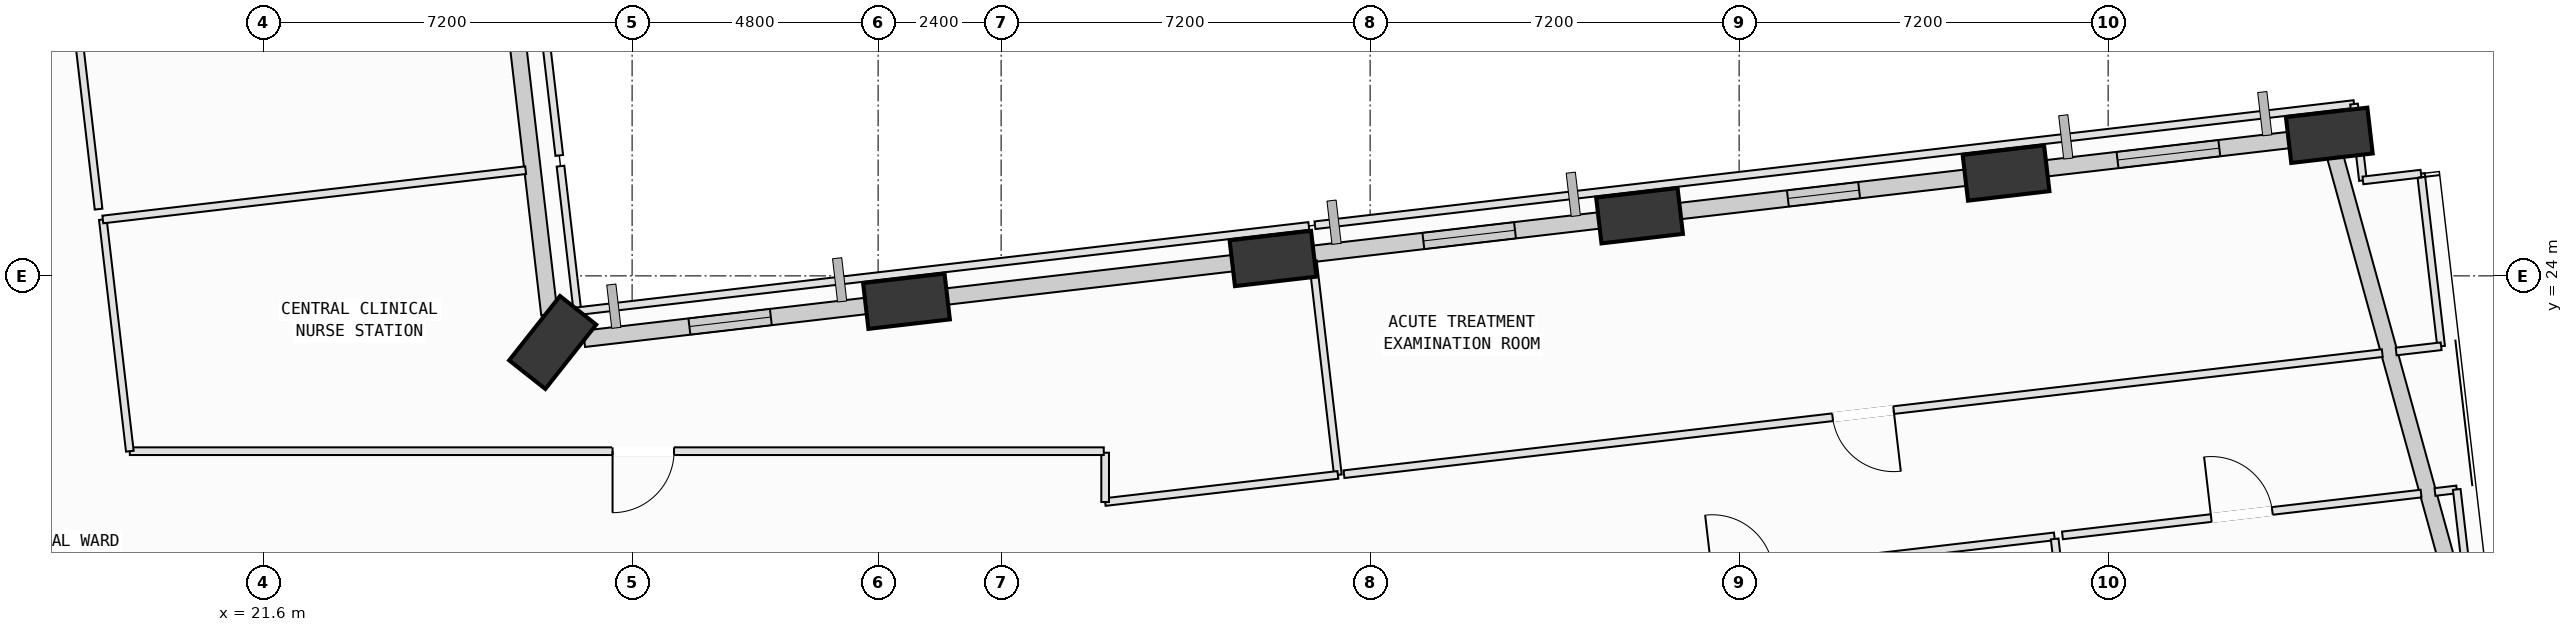
"""IFC4 building model, lengths in metres.
Left out: names, types, materials, properties, quantities, classifications, styles, units other than length and angle.
Written with IfcOpenShell. Run it as: python <this file> out.ifc"""

import sys

from ifc_helpers import new_model, si_unit, direction, frame, frame_2d, origin, origin_2d, place, context, subcontext, project, spatial, rectangle, extrude, element, fill, save


model = new_model("IFC4")
c1 = context("Model", 3, precision=1e-05, world=origin(), true_north=direction((0.0, 1.0)))
c2 = subcontext(c1, "Body", "Model", "MODEL_VIEW")
j1 = project(units=[si_unit("LENGTHUNIT", "METRE"), si_unit("PLANEANGLEUNIT", "RADIAN")], contexts=[c1])
p1 = place(None, origin())
s1 = spatial("IfcSite", under=j1, at=p1, CompositionType="ELEMENT")
p2 = place(p1, origin())
s2 = spatial("IfcBuilding", under=s1, at=p2, CompositionType="ELEMENT")
p3 = place(p2, frame((0.0, 0.0, 51.0)))
s3 = spatial("IfcBuildingStorey", under=s2, at=p3, CompositionType="ELEMENT", Elevation=51.0)
p4 = place(p3, frame((64.529, 17.281, 0.002), z_axis=(0.029857269994, 0.127362756182, 0.991406713598), x_axis=(-0.112008268746, -0.985175573606, 0.129935510555)))
e1 = element("IfcColumn", 1, at=p4, inside=s3, PredefinedType="COLUMN", context=c2, shape_type="SweptSolid", body=[
    extrude(rectangle(XDim=1.6, YDim=0.9, at=origin_2d()), origin(), (0.0, 0.0, 1.0), 4.031),
])
p5 = place(p3, frame((61.916, 26.742, 0.002), z_axis=(-0.008918351328, 0.11648458877, 0.993152457374), x_axis=(-0.981593797362, -0.190500884443, 0.013528858272)))
e2 = element("IfcColumn", 2, at=p5, inside=s3, PredefinedType="COLUMN", context=c2, shape_type="SweptSolid", body=[
    extrude(rectangle(XDim=1.6, YDim=0.9, at=origin_2d()), origin(), (0.0, 0.0, 1.0), 4.024),
])
p6 = place(p3, frame((55.608, 26.007, 0.002), z_axis=(-0.005779215637, 0.090824936271, 0.995850104995), x_axis=(-0.983944135111, -0.178165274591, 0.01053916079)))
e3 = element("IfcColumn", 3, at=p6, inside=s3, PredefinedType="COLUMN", context=c2, shape_type="SweptSolid", body=[
    extrude(rectangle(XDim=1.6, YDim=0.9, at=origin_2d()), origin(), (0.0, 0.0, 1.0), 4.013),
])
p7 = place(p3, frame((48.457, 25.173, 0.002), z_axis=(-0.002073039244, 0.061459516411, 0.998107424254), x_axis=(-0.988811054512, -0.149003306993, 0.007121304679)))
e4 = element("IfcColumn", 4, at=p7, inside=s3, PredefinedType="COLUMN", context=c2, shape_type="SweptSolid", body=[
    extrude(rectangle(XDim=1.6, YDim=0.9, at=origin_2d()), origin(), (0.0, 0.0, 1.0), 4.004),
])
p8 = place(p3, frame((41.305, 24.339, 0.002), z_axis=(0.001648515221, 0.031932350395, 0.99948867297), x_axis=(-0.997918513373, -0.064381129267, 0.003702817988)))
e5 = element("IfcColumn", 5, at=p8, inside=s3, PredefinedType="COLUMN", context=c2, shape_type="SweptSolid", body=[
    extrude(rectangle(XDim=1.6, YDim=0.9, at=origin_2d()), origin(), (0.0, 0.0, 1.0), 3.999),
])
p9 = place(p3, frame((34.154, 23.505, 0.002), z_axis=(0.005375595078, 0.002321279693, 0.999982857172), x_axis=(-0.500082287916, 0.865977624149, 0.000678075236)))
e6 = element("IfcColumn", 6, at=p9, inside=s3, PredefinedType="COLUMN", context=c2, shape_type="SweptSolid", body=[
    extrude(rectangle(XDim=1.6, YDim=0.9, at=origin_2d()), origin(), (0.0, 0.0, 1.0), 3.997),
])
p10 = place(p3, frame((27.25, 22.7, 0.002), z_axis=(0.008915338455, -0.026196439708, 0.999617058321), x_axis=(0.334811753302, 0.942035106952, 0.021701316121)))
e7 = element("IfcColumn", 7, at=p10, inside=s3, PredefinedType="COLUMN", context=c2, shape_type="SweptSolid", body=[
    extrude(rectangle(XDim=1.6, YDim=0.9, at=origin_2d()), origin(), (0.0, 0.0, 1.0), 3.998),
])
p11 = place(p3, frame((62.015, 26.38, 0.0), z_axis=(0.0, 0.0, 1.0), x_axis=(0.266250491898, -0.963903872574, 0.0)))
e8 = element("IfcWall", 8, at=p11, inside=s3, PredefinedType="SOLIDWALL", context=c2, shape_type="SweptSolid", body=[
    extrude(rectangle(XDim=8.614, YDim=0.32, at=frame_2d((4.307, 0.0))), origin(), (0.0, 0.0, 1.0), 3.165),
])
p12 = place(p3, frame((56.194, 26.075, 0.0), z_axis=(0.0, 0.0, 1.0), x_axis=(0.993271318264, 0.115810570822, 0.0)))
e9 = element("IfcWall", 9, at=p12, inside=s3, PredefinedType="SOLIDWALL", context=c2, shape_type="SweptSolid", body=[
    extrude(rectangle(XDim=5.209, YDim=0.32, at=frame_2d((2.604, 0.0))), origin(), (0.0, 0.0, 1.0), 3.165),
])
p13 = place(p12, frame((1.6, 0.0, 0.75)))
e10 = element("IfcOpeningElement", 10, at=p13, cuts=e9, PredefinedType="OPENING", context=c2, shape_type="SweptSolid", body=[
    extrude(rectangle(XDim=2.0, YDim=1.95, at=frame_2d((1.0, 0.975))), frame((0.0, 0.17, 0.0), z_axis=(0.0, -1.0, 0.0), x_axis=(1.0, 0.0, 0.0)), (0.0, 0.0, 1.0), 0.34),
])
p14 = place(p3, frame((49.058, 25.243, 0.0), z_axis=(0.0, 0.0, 1.0), x_axis=(0.993274795212, 0.115780746223, 0.0)))
e11 = element("IfcWall", 11, at=p14, inside=s3, PredefinedType="SOLIDWALL", context=c2, shape_type="SweptSolid", body=[
    extrude(rectangle(XDim=6.024, YDim=0.32, at=frame_2d((3.012, 0.0))), origin(), (0.0, 0.0, 1.0), 3.165),
])
p15 = place(p14, frame((2.309, 0.0, 0.75)))
e12 = element("IfcOpeningElement", 12, at=p15, cuts=e11, PredefinedType="OPENING", context=c2, shape_type="SweptSolid", body=[
    extrude(rectangle(XDim=1.4, YDim=1.85, at=frame_2d((0.7, 0.925))), frame((0.0, 0.17, 0.0), z_axis=(0.0, -1.0, 0.0), x_axis=(1.0, 0.0, 0.0)), (0.0, 0.0, 1.0), 0.34),
])
p16 = place(p3, frame((41.916, 24.41, 0.0), z_axis=(0.0, 0.0, 1.0), x_axis=(0.993271177126, 0.115811781314, 0.0)))
e13 = element("IfcWall", 13, at=p16, inside=s3, PredefinedType="SOLIDWALL", context=c2, shape_type="SweptSolid", body=[
    extrude(rectangle(XDim=6.0, YDim=0.32, at=frame_2d((3.0, 0.0))), origin(), (0.0, 0.0, 1.0), 3.165),
])
p17 = place(p16, frame((2.338, 0.0, 0.75)))
e14 = element("IfcOpeningElement", 14, at=p17, cuts=e13, PredefinedType="OPENING", context=c2, shape_type="SweptSolid", body=[
    extrude(rectangle(XDim=1.8, YDim=2.05, at=frame_2d((0.9, 1.025))), frame((0.0, 0.17, 0.0), z_axis=(0.0, -1.0, 0.0), x_axis=(1.0, 0.0, 0.0)), (0.0, 0.0, 1.0), 0.34),
])
p18 = place(p3, frame((34.769, 23.577, 0.0), z_axis=(0.0, 0.0, 1.0), x_axis=(0.993271428488, 0.115809625458, 0.0)))
e15 = element("IfcWall", 15, at=p18, inside=s3, PredefinedType="SOLIDWALL", context=c2, shape_type="SweptSolid", body=[
    extrude(rectangle(XDim=5.987, YDim=0.32, at=frame_2d((2.994, 0.0))), origin(), (0.0, 0.0, 1.0), 3.165),
])
p19 = place(p3, frame((27.863, 22.772, 0.0), z_axis=(0.0, 0.0, 1.0), x_axis=(0.993271790668, 0.115806519085, 0.0)))
e16 = element("IfcWall", 16, at=p19, inside=s3, PredefinedType="SOLIDWALL", context=c2, shape_type="SweptSolid", body=[
    extrude(rectangle(XDim=5.736, YDim=0.32, at=frame_2d((2.868, 0.0))), origin(), (0.0, 0.0, 1.0), 3.165),
])
p20 = place(p19, frame((2.069, 0.0, 0.75)))
e17 = element("IfcOpeningElement", 17, at=p20, cuts=e16, PredefinedType="OPENING", context=c2, shape_type="SweptSolid", body=[
    extrude(rectangle(XDim=1.6, YDim=1.95, at=frame_2d((0.8, 0.975))), frame((0.0, 0.17, 0.0), z_axis=(0.0, -1.0, 0.0), x_axis=(1.0, 0.0, 0.0)), (0.0, 0.0, 1.0), 0.34),
])
p21 = place(p3, frame((27.186, 23.25, 0.0), z_axis=(0.0, 0.0, 1.0), x_axis=(-0.115796553451, 0.993272952521, 0.0)))
e18 = element("IfcWall", 18, at=p21, inside=s3, PredefinedType="SOLIDWALL", context=c2, shape_type="SweptSolid", body=[
    extrude(rectangle(XDim=6.536, YDim=0.32, at=frame_2d((3.268, 0.0))), origin(), (0.0, 0.0, 1.0), 3.165),
])
p22 = place(p3, frame((44.393, 17.501, 0.0), z_axis=(0.0, 0.0, 1.0), x_axis=(0.993276639016, 0.115764927265, 0.0)))
e19 = element("IfcWall", 19, at=p22, inside=s3, PredefinedType="PARTITIONING", context=c2, shape_type="SweptSolid", body=[
    extrude(rectangle(XDim=12.24, YDim=0.15, at=frame_2d((6.12, 0.0))), origin(), (0.0, 0.0, 1.0), 3.78),
])
p23 = place(p22, frame((5.52, 0.0, 0.0)))
e20 = element("IfcOpeningElement", 20, at=p23, cuts=e19, PredefinedType="OPENING", context=c2, shape_type="SweptSolid", body=[
    extrude(rectangle(XDim=1.2, YDim=2.15, at=frame_2d((0.6, 1.075))), frame((0.0, 0.085, 0.0), z_axis=(0.0, -1.0, 0.0), x_axis=(1.0, 0.0, 0.0)), (0.0, 0.0, 1.0), 0.17),
])
p24 = place(p3, frame((56.557, 18.868, 0.0), z_axis=(0.0, 0.0, 1.0), x_axis=(0.115751957705, -0.993278150513, 0.0)))
e21 = element("IfcWall", 21, at=p24, inside=s3, PredefinedType="PARTITIONING", context=c2, shape_type="SweptSolid", body=[
    extrude(rectangle(XDim=13.564, YDim=0.15, at=frame_2d((6.782, 0.0))), origin(), (0.0, 0.0, 1.0), 3.78),
])
p25 = place(p3, frame((56.709, 18.937, 0.0), z_axis=(0.0, 0.0, 1.0), x_axis=(0.993269785823, 0.115823713336, 0.0)))
e22 = element("IfcWall", 22, at=p25, inside=s3, PredefinedType="PARTITIONING", context=c2, shape_type="SweptSolid", body=[
    extrude(rectangle(XDim=7.044, YDim=0.15, at=frame_2d((3.522, 0.0))), origin(), (0.0, 0.0, 1.0), 3.78),
])
p26 = place(p25, frame((2.922, 0.0, 0.0)))
e23 = element("IfcOpeningElement", 23, at=p26, cuts=e22, PredefinedType="OPENING", context=c2, shape_type="SweptSolid", body=[
    extrude(rectangle(XDim=1.2, YDim=2.15, at=frame_2d((0.6, 1.075))), frame((0.0, 0.085, 0.0), z_axis=(0.0, -1.0, 0.0), x_axis=(1.0, 0.0, 0.0)), (0.0, 0.0, 1.0), 0.17),
])
p27 = place(p3, frame((63.977, 19.784, 0.0), z_axis=(0.0, 0.0, 1.0), x_axis=(0.99313891796, 0.116940538875, 0.0)))
e24 = element("IfcWall", 24, at=p27, inside=s3, PredefinedType="PARTITIONING", context=c2, shape_type="SweptSolid", body=[
    extrude(rectangle(XDim=0.428, YDim=0.15, at=frame_2d((0.214, 0.0))), origin(), (0.0, 0.0, 1.0), 3.78),
])
p28 = place(p3, frame((64.402, 19.834, 0.0), z_axis=(0.0, 0.0, 1.0), x_axis=(0.115756627121, -0.993277606351, 0.0)))
e25 = element("IfcWall", 25, at=p28, inside=s3, PredefinedType="PARTITIONING", context=c2, shape_type="SweptSolid", body=[
    extrude(rectangle(XDim=1.424, YDim=0.15, at=frame_2d((0.712, 0.0))), origin(), (0.0, 0.0, 1.0), 3.165),
])
p29 = place(p3, frame((42.083, 24.294, 0.0), z_axis=(0.0, 0.0, 1.0), x_axis=(0.116049657035, -0.993243412816, 0.0)))
e26 = element("IfcWall", 26, at=p29, inside=s3, PredefinedType="PARTITIONING", context=c2, shape_type="SweptSolid", body=[
    extrude(rectangle(XDim=4.205, YDim=0.15, at=frame_2d((2.103, 0.0))), origin(), (0.0, 0.0, 1.0), 3.78),
])
p30 = place(p3, frame((42.571, 20.117, 0.0), z_axis=(0.0, 0.0, 1.0), x_axis=(-0.993281566308, -0.115722642698, 0.0)))
e27 = element("IfcWall", 27, at=p30, inside=s3, PredefinedType="PARTITIONING", context=c2, shape_type="SweptSolid", body=[
    extrude(rectangle(XDim=4.572, YDim=0.15, at=frame_2d((2.286, 0.0))), origin(), (0.0, 0.0, 1.0), 3.78),
])
p31 = place(p3, frame((38.03, 19.588, 0.0), z_axis=(0.0, 0.0, 1.0), x_axis=(0.0, 1.0, 0.0)))
e28 = element("IfcWall", 28, at=p31, inside=s3, PredefinedType="PARTITIONING", context=c2, shape_type="SweptSolid", body=[
    extrude(rectangle(XDim=0.962, YDim=0.15, at=frame_2d((0.481, 0.0))), origin(), (0.0, 0.0, 1.0), 3.78),
])
p32 = place(p3, frame((38.003, 20.58, 0.0), z_axis=(0.0, 0.0, 1.0), x_axis=(-1.0, 0.0, 0.0)))
e29 = element("IfcWall", 29, at=p32, inside=s3, PredefinedType="PARTITIONING", context=c2, shape_type="SweptSolid", body=[
    extrude(rectangle(XDim=19.003, YDim=0.15, at=frame_2d((9.501, 0.0))), origin(), (0.0, 0.0, 1.0), 3.365),
])
p33 = place(p32, frame((8.384, 0.0, 0.0)))
e30 = element("IfcOpeningElement", 30, at=p33, cuts=e29, PredefinedType="OPENING", context=c2, shape_type="SweptSolid", body=[
    extrude(rectangle(XDim=1.2, YDim=2.15, at=frame_2d((0.6, 1.075))), frame((0.0, 0.085, 0.0), z_axis=(0.0, -1.0, 0.0), x_axis=(1.0, 0.0, 0.0)), (0.0, 0.0, 1.0), 0.17),
])
p34 = place(p3, frame((19.0, 20.58, 0.0), z_axis=(0.0, 0.0, 1.0), x_axis=(-0.115829534516, 0.993269107007, 0.0)))
e31 = element("IfcWall", 31, at=p34, inside=s3, PredefinedType="PARTITIONING", context=c2, shape_type="SweptSolid", body=[
    extrude(rectangle(XDim=4.551, YDim=0.15, at=frame_2d((2.275, 0.0))), origin(), (0.0, 0.0, 1.0), 3.78),
])
p35 = place(p3, frame((18.473, 25.1, 0.0), z_axis=(0.0, 0.0, 1.0), x_axis=(0.993271256361, 0.115811101742, 0.0)))
e32 = element("IfcWall", 32, at=p35, inside=s3, PredefinedType="PARTITIONING", context=c2, shape_type="SweptSolid", body=[
    extrude(rectangle(XDim=8.306, YDim=0.15, at=frame_2d((4.153, 0.0))), origin(), (0.0, 0.0, 1.0), 3.78),
])
p36 = place(p3, frame((27.403, 26.141, 0.0), z_axis=(0.0, 0.0, 1.0), x_axis=(0.115762348631, -0.993276939549, 0.0)))
e33 = element("IfcWall", 33, at=p36, inside=s3, PredefinedType="PARTITIONING", context=c2, shape_type="SweptSolid", body=[
    extrude(rectangle(XDim=2.849, YDim=0.15, at=frame_2d((1.425, 0.0))), origin(), (0.0, 0.0, 1.0), 3.78),
])
p37 = place(p3, frame((27.733, 23.311, 0.0), z_axis=(0.0, 0.0, 1.0), x_axis=(0.993278060378, 0.115752731161, 0.0)))
e34 = element("IfcWall", 34, at=p37, inside=s3, PredefinedType="PARTITIONING", context=c2, shape_type="SweptSolid", body=[
    extrude(rectangle(XDim=14.368, YDim=0.15, at=frame_2d((7.184, 0.0))), origin(), (0.0, 0.0, 1.0), 3.165),
])
p38 = place(p3, frame((63.704, 25.994, 0.0), z_axis=(0.0, 0.0, 1.0), x_axis=(0.115884252329, -0.993262724591, 0.0)))
e35 = element("IfcWall", 35, at=p38, inside=s3, PredefinedType="PARTITIONING", context=c2, shape_type="SweptSolid", body=[
    extrude(rectangle(XDim=3.39, YDim=0.15, at=frame_2d((1.695, 0.0))), origin(), (0.0, 0.0, 1.0), 3.78),
])
p39 = place(p3, frame((64.097, 22.627, 0.0), z_axis=(0.0, 0.0, 1.0), x_axis=(-0.99329704702, -0.11558968977, 0.0)))
e36 = element("IfcWall", 36, at=p39, inside=s3, PredefinedType="PARTITIONING", context=c2, shape_type="SweptSolid", body=[
    extrude(rectangle(XDim=0.883, YDim=0.15, at=frame_2d((0.441, 0.0))), origin(), (0.0, 0.0, 1.0), 3.78),
])
p40 = place(p3, frame((62.949, 22.493, 0.0), z_axis=(0.0, 0.0, 1.0), x_axis=(-0.993272940405, -0.115796657373, 0.0)))
e37 = element("IfcWall", 37, at=p40, inside=s3, PredefinedType="PARTITIONING", context=c2, shape_type="SweptSolid", body=[
    extrude(rectangle(XDim=20.396, YDim=0.15, at=frame_2d((10.198, 0.0))), origin(), (0.0, 0.0, 1.0), 3.78),
])
p41 = place(p40, frame((9.598, 0.0, 0.0)))
e38 = element("IfcOpeningElement", 38, at=p41, cuts=e37, PredefinedType="OPENING", context=c2, shape_type="SweptSolid", body=[
    extrude(rectangle(XDim=1.2, YDim=2.15, at=frame_2d((0.6, 1.075))), frame((0.0, 0.085, 0.0), z_axis=(0.0, -1.0, 0.0), x_axis=(1.0, 0.0, 0.0)), (0.0, 0.0, 1.0), 0.17),
])
p42 = place(p3, frame((42.124, 24.988, 0.0), z_axis=(0.0, 0.0, 1.0), x_axis=(0.993270341993, 0.115818943685, 0.0)))
e39 = element("IfcWall", 39, at=p42, inside=s3, PredefinedType="PARTITIONING", context=c2, shape_type="SweptSolid", body=[
    extrude(rectangle(XDim=20.411, YDim=0.15, at=frame_2d((10.206, 0.0))), origin(), (0.0, 0.0, 1.0), 3.165),
])
p43 = place(p3, frame((62.398, 27.352, 0.0), z_axis=(0.0, 0.0, 1.0), x_axis=(0.116038583611, -0.993244706562, 0.0)))
e40 = element("IfcWall", 40, at=p43, inside=s3, PredefinedType="PARTITIONING", context=c2, shape_type="SweptSolid", body=[
    extrude(rectangle(XDim=1.5, YDim=0.15, at=frame_2d((0.75, 0.0))), origin(), (0.0, 0.0, 1.0), 3.165),
])
p44 = place(p3, frame((62.572, 25.862, 0.0), z_axis=(0.0, 0.0, 1.0), x_axis=(0.993287361891, 0.115672886655, 0.0)))
e41 = element("IfcWall", 41, at=p44, inside=s3, PredefinedType="PARTITIONING", context=c2, shape_type="SweptSolid", body=[
    extrude(rectangle(XDim=1.14, YDim=0.15, at=frame_2d((0.57, 0.0))), origin(), (0.0, 0.0, 1.0), 3.78),
])
p45 = place(p3, frame((18.39, 25.302, 0.0), z_axis=(0.0, 0.0, 1.0), x_axis=(-0.115805129376, 0.993271952695, 0.0)))
e42 = element("IfcWall", 42, at=p45, inside=s3, PredefinedType="PARTITIONING", context=c2, shape_type="SweptSolid", body=[
    extrude(rectangle(XDim=8.34, YDim=0.15, at=frame_2d((4.17, 0.0))), origin(), (0.0, 0.0, 1.0), 3.78),
])
p46 = place(p45, frame((3.57, 0.0, 0.0)))
e43 = element("IfcOpeningElement", 43, at=p46, cuts=e42, PredefinedType="OPENING", context=c2, shape_type="SweptSolid", body=[
    extrude(rectangle(XDim=1.2, YDim=2.15, at=frame_2d((0.6, 1.075))), frame((0.0, 0.085, 0.0), z_axis=(0.0, -1.0, 0.0), x_axis=(1.0, 0.0, 0.0)), (0.0, 0.0, 1.0), 0.17),
])
p47 = place(p3, frame((26.413, 34.634, 0.0), z_axis=(0.0, 0.0, 1.0), x_axis=(0.115805129376, -0.993271952695, 0.0)))
e44 = element("IfcWall", 44, at=p47, inside=s3, PredefinedType="PARTITIONING", context=c2, shape_type="SweptSolid", body=[
    extrude(rectangle(XDim=8.34, YDim=0.15, at=frame_2d((4.17, 0.0))), origin(), (0.0, 0.0, 1.0), 3.78),
])
p48 = place(p13, origin())
e45 = element("IfcWindow", 45, at=p48, inside=s3, PartitioningType="SINGLE_PANEL", PredefinedType="WINDOW", context=c2, shape_type="SweptSolid", body=[
    extrude(rectangle(XDim=2.0, YDim=1.95, at=frame_2d((1.0, 0.975))), frame((0.0, 0.03, 0.0), z_axis=(0.0, -1.0, 0.0), x_axis=(1.0, 0.0, 0.0)), (0.0, 0.0, 1.0), 0.06),
])
fill(e10, e45)
p49 = place(p15, origin())
e46 = element("IfcWindow", 46, at=p49, inside=s3, PartitioningType="SINGLE_PANEL", PredefinedType="WINDOW", context=c2, shape_type="SweptSolid", body=[
    extrude(rectangle(XDim=1.4, YDim=1.85, at=frame_2d((0.7, 0.925))), frame((0.0, 0.03, 0.0), z_axis=(0.0, -1.0, 0.0), x_axis=(1.0, 0.0, 0.0)), (0.0, 0.0, 1.0), 0.06),
])
fill(e12, e46)
p50 = place(p17, origin())
e47 = element("IfcWindow", 47, at=p50, inside=s3, PartitioningType="SINGLE_PANEL", PredefinedType="WINDOW", context=c2, shape_type="SweptSolid", body=[
    extrude(rectangle(XDim=1.8, YDim=2.05, at=frame_2d((0.9, 1.025))), frame((0.0, 0.03, 0.0), z_axis=(0.0, -1.0, 0.0), x_axis=(1.0, 0.0, 0.0)), (0.0, 0.0, 1.0), 0.06),
])
fill(e14, e47)
p51 = place(p20, origin())
e48 = element("IfcWindow", 48, at=p51, inside=s3, PartitioningType="SINGLE_PANEL", PredefinedType="WINDOW", context=c2, shape_type="SweptSolid", body=[
    extrude(rectangle(XDim=1.6, YDim=1.95, at=frame_2d((0.8, 0.975))), frame((0.0, 0.03, 0.0), z_axis=(0.0, -1.0, 0.0), x_axis=(1.0, 0.0, 0.0)), (0.0, 0.0, 1.0), 0.06),
])
fill(e17, e48)
p52 = place(p26, origin())
e49 = element("IfcDoor", 49, at=p52, inside=s3, OperationType="SINGLE_SWING_LEFT", PredefinedType="DOOR", context=c2, shape_type="SweptSolid", body=[
    extrude(rectangle(XDim=1.2, YDim=2.15, at=frame_2d((0.6, 1.075))), frame((0.0, 0.025, 0.0), z_axis=(0.0, -1.0, 0.0), x_axis=(1.0, 0.0, 0.0)), (0.0, 0.0, 1.0), 0.05),
])
fill(e23, e49)
p53 = place(p33, origin())
e50 = element("IfcDoor", 50, at=p53, inside=s3, OperationType="SINGLE_SWING_RIGHT", PredefinedType="DOOR", context=c2, shape_type="SweptSolid", body=[
    extrude(rectangle(XDim=1.2, YDim=2.15, at=frame_2d((0.6, 1.075))), frame((0.0, 0.025, 0.0), z_axis=(0.0, -1.0, 0.0), x_axis=(1.0, 0.0, 0.0)), (0.0, 0.0, 1.0), 0.05),
])
fill(e30, e50)
p54 = place(p41, origin())
e51 = element("IfcDoor", 51, at=p54, inside=s3, OperationType="SINGLE_SWING_LEFT", PredefinedType="DOOR", context=c2, shape_type="SweptSolid", body=[
    extrude(rectangle(XDim=1.2, YDim=2.15, at=frame_2d((0.6, 1.075))), frame((0.0, 0.025, 0.0), z_axis=(0.0, -1.0, 0.0), x_axis=(1.0, 0.0, 0.0)), (0.0, 0.0, 1.0), 0.05),
])
fill(e38, e51)
save(model, sys.argv[1])
